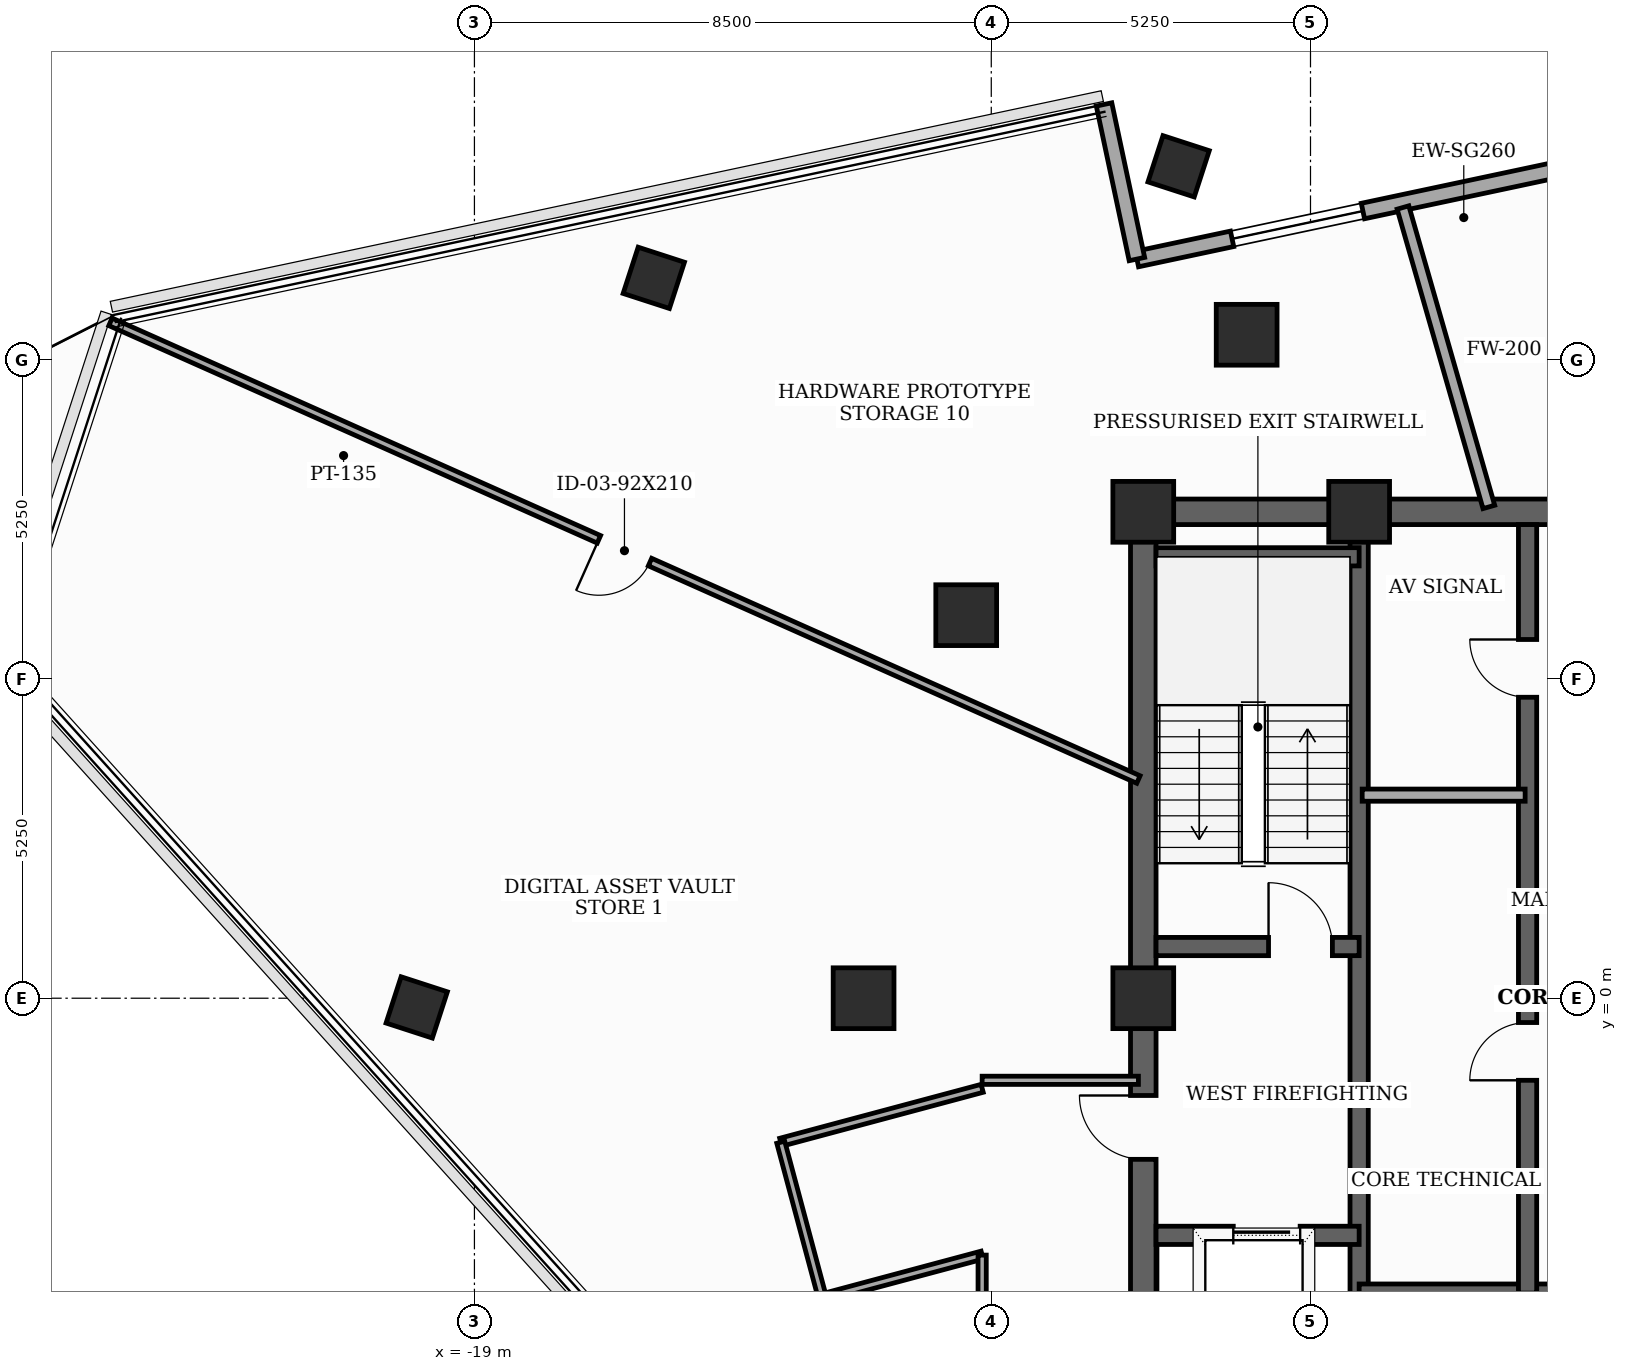
"""IFC4 building model, lengths in metres.
Left out: names, types, materials, properties, quantities, classifications, styles, units other than length and angle.
Written with IfcOpenShell. Run it as: python <this file> out.ifc"""

import sys

from ifc_helpers import new_model, si_unit, direction, frame, frame_2d, origin, origin_2d, place, context, subcontext, project, spatial, rectangle, extrude, element, fill, save


model = new_model("IFC4")
c1 = context("Model", 3, precision=1e-05, world=origin(), true_north=direction((0.0, 1.0)))
c2 = subcontext(c1, "Body", "Model", "MODEL_VIEW")
j1 = project(units=[si_unit("LENGTHUNIT", "METRE"), si_unit("PLANEANGLEUNIT", "RADIAN")], contexts=[c1])
p1 = place(None, origin())
s1 = spatial("IfcSite", under=j1, at=p1, CompositionType="ELEMENT")
p2 = place(p1, origin())
s2 = spatial("IfcBuilding", under=s1, at=p2, CompositionType="ELEMENT")
p3 = place(p2, frame((0.0, 0.0, 301.7)))
s3 = spatial("IfcBuildingStorey", under=s2, at=p3, CompositionType="ELEMENT", Elevation=301.7)
for number, where, z_axis, x_axis in (
    (1, (-4.45, 8.0, 0.0), (0.0, 0.0, 1.0), (1.0, 0.0, 0.0)),
    (2, (-8.0, 8.0, 0.0), (0.0, 0.0, 1.0), (1.0, 0.0, 0.0)),
    (3, (-8.0, 0.0, 0.0), (0.0, 0.0, 1.0), (1.0, 0.0, 0.0)),
    (4, (-6.3, 10.912, 0.0), (0.0, 0.0, 1.0), (1.0, 0.0, 0.0)),
    (5, (-10.912, 6.3, 0.0), (0.0, 0.0, 1.0), (1.0, 0.0, 0.0)),
    (6, (-12.6, 0.0, 0.0), (0.0, 0.0, 1.0), (1.0, 0.0, 0.0)),
):
    element("IfcColumn", number, at=place(p3, frame(where, z_axis=z_axis, x_axis=x_axis)), inside=s3, PredefinedType="COLUMN", context=c2, shape_type="SweptSolid", body=[
        extrude(rectangle(XDim=1.0, YDim=1.0, at=origin_2d()), origin(), (0.0, 0.0, 1.0), 3.7),
    ])
for number, where, z_axis, x_axis in (
    (7, (-7.419, 13.683, 0.0), (0.0, 0.0, 1.0), (0.309, 0.951, 0.0)),
    (8, (-16.05, 11.848, 0.0), (0.0, 0.0, 1.0), (0.309, 0.951, 0.0)),
    (9, (-19.949, -0.151, 0.0), (0.0, 0.0, 1.0), (0.309, 0.951, 0.0)),
):
    element("IfcColumn", number, at=place(p3, frame(where, z_axis=z_axis, x_axis=x_axis)), inside=s3, PredefinedType="COLUMN", context=c2, shape_type="SweptSolid", body=[
        extrude(rectangle(XDim=0.8, YDim=0.8, at=origin_2d()), origin(), (0.0, 0.0, 1.0), 3.7),
    ])
p4 = place(p3, frame((2.459, 14.402, 0.0), z_axis=(0.0, 0.0, 1.0), x_axis=(-0.978149082982, -0.207904717268, 0.0)))
e10 = element("IfcWall", 10, at=p4, inside=s3, PredefinedType="SOLIDWALL", context=c2, shape_type="SweptSolid", body=[
    extrude(rectangle(XDim=10.8, YDim=0.26, at=frame_2d((5.4, 0.0))), origin(), (0.0, 0.0, 1.0), 3.5),
])
p5 = place(p4, frame((1.6, 0.0, 0.85)))
e11 = element("IfcOpeningElement", 11, at=p5, cuts=e10, PredefinedType="OPENING", context=c2, shape_type="SweptSolid", body=[
    extrude(rectangle(XDim=2.2, YDim=1.25, at=frame_2d((1.1, 0.625))), frame((0.0, 0.14, 0.0), z_axis=(0.0, -1.0, 0.0), x_axis=(1.0, 0.0, 0.0)), (0.0, 0.0, 1.0), 0.28),
])
p6 = place(p4, frame((7.0, 0.0, 0.85)))
e12 = element("IfcOpeningElement", 12, at=p6, cuts=e10, PredefinedType="OPENING", context=c2, shape_type="SweptSolid", body=[
    extrude(rectangle(XDim=2.2, YDim=1.25, at=frame_2d((1.1, 0.625))), frame((0.0, 0.14, 0.0), z_axis=(0.0, -1.0, 0.0), x_axis=(1.0, 0.0, 0.0)), (0.0, 0.0, 1.0), 0.28),
])
p7 = place(p3, frame((-8.105, 12.157, 0.0), z_axis=(0.0, 0.0, 1.0), x_axis=(-0.207893569688, 0.978151452323, 0.0)))
e13 = element("IfcWall", 13, at=p7, inside=s3, PredefinedType="SOLIDWALL", context=c2, shape_type="SweptSolid", body=[
    extrude(rectangle(XDim=2.6, YDim=0.26, at=frame_2d((1.3, 0.0))), origin(), (0.0, 0.0, 1.0), 3.5),
])
p8 = place(p3, frame((-8.0, -8.0, 0.0), z_axis=(0.0, 0.0, 1.0), x_axis=(0.0, 1.0, 0.0)))
e14 = element("IfcWall", 14, at=p8, inside=s3, PredefinedType="SHEAR", context=c2, shape_type="SweptSolid", body=[
    extrude(rectangle(XDim=16.0, YDim=0.42, at=frame_2d((8.0, 0.0))), origin(), (0.0, 0.0, 1.0), 3.5),
])
p9 = place(p8, frame((0.681, 0.0, 0.0)))
e15 = element("IfcOpeningElement", 15, at=p9, cuts=e14, PredefinedType="OPENING", context=c2, shape_type="SweptSolid", body=[
    extrude(rectangle(XDim=0.85, YDim=2.02, at=frame_2d((0.425, 1.01))), frame((0.0, 0.22, 0.0), z_axis=(0.0, -1.0, 0.0), x_axis=(1.0, 0.0, 0.0)), (0.0, 0.0, 1.0), 0.44),
])
p10 = place(p8, frame((5.35, 0.0, 0.0)))
e16 = element("IfcOpeningElement", 16, at=p10, cuts=e14, PredefinedType="OPENING", context=c2, shape_type="SweptSolid", body=[
    extrude(rectangle(XDim=1.05, YDim=2.15, at=frame_2d((0.525, 1.075))), frame((0.0, 0.22, 0.0), z_axis=(0.0, -1.0, 0.0), x_axis=(1.0, 0.0, 0.0)), (0.0, 0.0, 1.0), 0.44),
])
p11 = place(p3, frame((-8.0, 8.0, 0.0), z_axis=(0.0, 0.0, 1.0), x_axis=(1.0, 0.0, 0.0)))
e17 = element("IfcWall", 17, at=p11, inside=s3, PredefinedType="SHEAR", context=c2, shape_type="SweptSolid", body=[
    extrude(rectangle(XDim=16.0, YDim=0.42, at=frame_2d((8.0, 0.0))), origin(), (0.0, 0.0, 1.0), 3.5),
])
p12 = place(p11, frame((7.1, 0.0, 0.0)))
e18 = element("IfcOpeningElement", 18, at=p12, cuts=e17, PredefinedType="OPENING", context=c2, shape_type="SweptSolid", body=[
    extrude(rectangle(XDim=1.8, YDim=2.15, at=frame_2d((0.9, 1.075))), frame((0.0, 0.22, 0.0), z_axis=(0.0, -1.0, 0.0), x_axis=(1.0, 0.0, 0.0)), (0.0, 0.0, 1.0), 0.44),
])
p13 = place(p3, frame((-4.45, -7.79, 0.0), z_axis=(0.0, 0.0, 1.0), x_axis=(0.0, 1.0, 0.0)))
e19 = element("IfcWall", 19, at=p13, inside=s3, PredefinedType="SHEAR", context=c2, shape_type="SweptSolid", body=[
    extrude(rectangle(XDim=15.58, YDim=0.3, at=frame_2d((7.79, 0.0))), origin(), (0.0, 0.0, 1.0), 3.5),
])
p14 = place(p3, frame((-7.79, 0.85, 0.0), z_axis=(0.0, 0.0, 1.0), x_axis=(1.0, 0.0, 0.0)))
e20 = element("IfcWall", 20, at=p14, inside=s3, PredefinedType="SHEAR", context=c2, shape_type="SweptSolid", body=[
    extrude(rectangle(XDim=3.34, YDim=0.3, at=frame_2d((1.67, 0.0))), origin(), (0.0, 0.0, 1.0), 3.5),
])
p15 = place(p14, frame((1.85, 0.0, 0.0)))
e21 = element("IfcOpeningElement", 21, at=p15, cuts=e20, PredefinedType="OPENING", context=c2, shape_type="SweptSolid", body=[
    extrude(rectangle(XDim=1.05, YDim=2.15, at=frame_2d((0.525, 1.075))), frame((0.0, 0.16, 0.0), z_axis=(0.0, -1.0, 0.0), x_axis=(1.0, 0.0, 0.0)), (0.0, 0.0, 1.0), 0.32),
])
p16 = place(p3, frame((-7.79, 7.26, 0.0), z_axis=(0.0, 0.0, 1.0), x_axis=(1.0, 0.0, 0.0)))
e22 = element("IfcWall", 22, at=p16, inside=s3, PredefinedType="SHEAR", context=c2, shape_type="SweptSolid", body=[
    extrude(rectangle(XDim=3.34, YDim=0.3, at=frame_2d((1.67, 0.0))), origin(), (0.0, 0.0, 1.0), 3.5),
])
p17 = place(p3, frame((-7.79, -3.9, 0.0), z_axis=(0.0, 0.0, 1.0), x_axis=(1.0, 0.0, 0.0)))
e23 = element("IfcWall", 23, at=p17, inside=s3, PredefinedType="SHEAR", context=c2, shape_type="SweptSolid", body=[
    extrude(rectangle(XDim=3.34, YDim=0.3, at=frame_2d((1.67, 0.0))), origin(), (0.0, 0.0, 1.0), 3.5),
])
p18 = place(p17, frame((1.27, 0.0, 0.0)))
e24 = element("IfcOpeningElement", 24, at=p18, cuts=e23, PredefinedType="OPENING", context=c2, shape_type="SweptSolid", body=[
    extrude(rectangle(XDim=1.1, YDim=2.1, at=frame_2d((0.55, 1.05))), frame((0.0, 0.16, 0.0), z_axis=(0.0, -1.0, 0.0), x_axis=(1.0, 0.0, 0.0)), (0.0, 0.0, 1.0), 0.32),
])
p19 = place(p3, frame((-4.45, -4.85, 0.0), z_axis=(0.0, 0.0, 1.0), x_axis=(1.0, 0.0, 0.0)))
e25 = element("IfcWall", 25, at=p19, inside=s3, PredefinedType="SHEAR", context=c2, shape_type="SweptSolid", body=[
    extrude(rectangle(XDim=8.9, YDim=0.3, at=frame_2d((4.45, 0.0))), origin(), (0.0, 0.0, 1.0), 3.5),
])
p20 = place(p3, frame((-1.68, -4.85, 0.0), z_axis=(0.0, 0.0, 1.0), x_axis=(0.0, 1.0, 0.0)))
e26 = element("IfcWall", 26, at=p20, inside=s3, PredefinedType="SHEAR", context=c2, shape_type="SweptSolid", body=[
    extrude(rectangle(XDim=12.64, YDim=0.3, at=frame_2d((6.32, 0.0))), origin(), (0.0, 0.0, 1.0), 3.5),
])
p21 = place(p20, frame((3.5, 0.0, 0.0)))
e27 = element("IfcOpeningElement", 27, at=p21, cuts=e26, PredefinedType="OPENING", context=c2, shape_type="SweptSolid", body=[
    extrude(rectangle(XDim=0.95, YDim=2.1, at=frame_2d((0.475, 1.05))), frame((0.0, 0.16, 0.0), z_axis=(0.0, -1.0, 0.0), x_axis=(1.0, 0.0, 0.0)), (0.0, 0.0, 1.0), 0.32),
])
p22 = place(p20, frame((9.8, 0.0, 0.0)))
e28 = element("IfcOpeningElement", 28, at=p22, cuts=e26, PredefinedType="OPENING", context=c2, shape_type="SweptSolid", body=[
    extrude(rectangle(XDim=0.95, YDim=2.1, at=frame_2d((0.475, 1.05))), frame((0.0, 0.16, 0.0), z_axis=(0.0, -1.0, 0.0), x_axis=(1.0, 0.0, 0.0)), (0.0, 0.0, 1.0), 0.32),
])
p23 = place(p3, frame((-4.4, 3.34, 0.0), z_axis=(0.0, 0.0, 1.0), x_axis=(1.0, 0.0, 0.0)))
e29 = element("IfcWall", 29, at=p23, inside=s3, PredefinedType="SOLIDWALL", context=c2, shape_type="SweptSolid", body=[
    extrude(rectangle(XDim=2.68, YDim=0.2, at=frame_2d((1.34, 0.0))), origin(), (0.0, 0.0, 1.0), 3.5),
])
p24 = place(p3, frame((-8.08, -1.35, 0.0), z_axis=(0.0, 0.0, 1.0), x_axis=(-1.0, 0.0, 0.0)))
e30 = element("IfcWall", 30, at=p24, inside=s3, PredefinedType="PARTITIONING", context=c2, shape_type="SweptSolid", body=[
    extrude(rectangle(XDim=2.57, YDim=0.135, at=frame_2d((1.285, 0.0))), origin(), (0.0, 0.0, 1.0), 2.885),
])
p25 = place(p3, frame((-10.65, -1.482, 0.0), z_axis=(0.0, 0.0, 1.0), x_axis=(-0.965961397105, -0.2586862565, 0.0)))
e31 = element("IfcWall", 31, at=p25, inside=s3, PredefinedType="PARTITIONING", context=c2, shape_type="SweptSolid", body=[
    extrude(rectangle(XDim=3.429, YDim=0.135, at=frame_2d((1.714, 0.0))), origin(), (0.0, 0.0, 1.0), 2.885),
])
p26 = place(p3, frame((-13.962, -2.369, 0.0), z_axis=(0.0, 0.0, 1.0), x_axis=(0.258413725385, -0.966034340245, 0.0)))
e32 = element("IfcWall", 32, at=p26, inside=s3, PredefinedType="PARTITIONING", context=c2, shape_type="SweptSolid", body=[
    extrude(rectangle(XDim=2.65, YDim=0.135, at=frame_2d((1.325, 0.0))), origin(), (0.0, 0.0, 1.0), 3.5),
])
p27 = place(p3, frame((-13.277, -4.929, 0.0), z_axis=(0.0, 0.0, 1.0), x_axis=(0.965934830229, 0.258785439601, 0.0)))
e33 = element("IfcWall", 33, at=p27, inside=s3, PredefinedType="PARTITIONING", context=c2, shape_type="SweptSolid", body=[
    extrude(rectangle(XDim=2.72, YDim=0.135, at=frame_2d((1.36, 0.0))), origin(), (0.0, 0.0, 1.0), 2.885),
])
p28 = place(p3, frame((-10.65, -4.225, 0.0), z_axis=(0.0, 0.0, 1.0), x_axis=(0.0, -1.0, 0.0)))
e34 = element("IfcWall", 34, at=p28, inside=s3, PredefinedType="PARTITIONING", context=c2, shape_type="SweptSolid", body=[
    extrude(rectangle(XDim=5.925, YDim=0.135, at=frame_2d((2.962, 0.0))), origin(), (0.0, 0.0, 1.0), 2.885),
])
p29 = place(p28, frame((4.265, 0.0, 0.0)))
e35 = element("IfcOpeningElement", 35, at=p29, cuts=e34, PredefinedType="OPENING", context=c2, shape_type="SweptSolid", body=[
    extrude(rectangle(XDim=0.95, YDim=2.1, at=frame_2d((0.475, 1.05))), frame((0.0, 0.077, 0.0), z_axis=(0.0, -1.0, 0.0), x_axis=(1.0, 0.0, 0.0)), (0.0, 0.0, 1.0), 0.155),
])
p30 = place(p3, frame((-8.08, 3.597, 0.0), z_axis=(0.0, 0.0, 1.0), x_axis=(-0.913542590258, 0.406743083266, 0.0)))
e36 = element("IfcWall", 36, at=p30, inside=s3, PredefinedType="PARTITIONING", context=c2, shape_type="SweptSolid", body=[
    extrude(rectangle(XDim=18.505, YDim=0.135, at=frame_2d((9.252, 0.0))), origin(), (0.0, 0.0, 1.0), 2.885),
])
p31 = place(p30, frame((8.792, 0.0, 0.0)))
e37 = element("IfcOpeningElement", 37, at=p31, cuts=e36, PredefinedType="OPENING", context=c2, shape_type="SweptSolid", body=[
    extrude(rectangle(XDim=0.92, YDim=2.1, at=frame_2d((0.46, 1.05))), frame((0.0, 0.077, 0.0), z_axis=(0.0, -1.0, 0.0), x_axis=(1.0, 0.0, 0.0)), (0.0, 0.0, 1.0), 0.155),
])
p32 = place(p3, frame((-3.729, 13.005, 0.0), z_axis=(0.0, 0.0, 1.0), x_axis=(0.275658725111, -0.961255568135, 0.0)))
e38 = element("IfcWall", 38, at=p32, inside=s3, PredefinedType="SOLIDWALL", context=c2, shape_type="SweptSolid", body=[
    extrude(rectangle(XDim=5.124, YDim=0.2, at=frame_2d((2.562, 0.0))), origin(), (0.0, 0.0, 1.0), 2.885),
])
p33 = place(p6, origin())
e39 = element("IfcWindow", 39, at=p33, inside=s3, PartitioningType="SINGLE_PANEL", PredefinedType="WINDOW", context=c2, shape_type="SweptSolid", body=[
    extrude(rectangle(XDim=2.2, YDim=1.25, at=frame_2d((1.1, 0.625))), frame((0.0, 0.03, 0.0), z_axis=(0.0, -1.0, 0.0), x_axis=(1.0, 0.0, 0.0)), (0.0, 0.0, 1.0), 0.06),
])
fill(e12, e39)
p34 = place(p10, origin())
e40 = element("IfcDoor", 40, at=p34, inside=s3, OperationType="SINGLE_SWING_RIGHT", PredefinedType="DOOR", context=c2, shape_type="SweptSolid", body=[
    extrude(rectangle(XDim=1.05, YDim=2.15, at=frame_2d((0.525, 1.075))), frame((0.0, 0.025, 0.0), z_axis=(0.0, -1.0, 0.0), x_axis=(1.0, 0.0, 0.0)), (0.0, 0.0, 1.0), 0.05),
])
fill(e16, e40)
p35 = place(p15, origin())
e41 = element("IfcDoor", 41, at=p35, inside=s3, OperationType="SINGLE_SWING_LEFT", PredefinedType="DOOR", context=c2, shape_type="SweptSolid", body=[
    extrude(rectangle(XDim=1.05, YDim=2.15, at=frame_2d((0.525, 1.075))), frame((0.0, 0.025, 0.0), z_axis=(0.0, -1.0, 0.0), x_axis=(1.0, 0.0, 0.0)), (0.0, 0.0, 1.0), 0.05),
])
fill(e21, e41)
p36 = place(p18, origin())
e42 = element("IfcDoor", 42, at=p36, inside=s3, OperationType="SLIDING_TO_LEFT", PredefinedType="DOOR", context=c2, shape_type="SweptSolid", body=[
    extrude(rectangle(XDim=1.1, YDim=2.1, at=frame_2d((0.55, 1.05))), frame((0.0, 0.025, 0.0), z_axis=(0.0, -1.0, 0.0), x_axis=(1.0, 0.0, 0.0)), (0.0, 0.0, 1.0), 0.05),
])
fill(e24, e42)
p37 = place(p21, origin())
e43 = element("IfcDoor", 43, at=p37, inside=s3, OperationType="SINGLE_SWING_LEFT", PredefinedType="DOOR", context=c2, shape_type="SweptSolid", body=[
    extrude(rectangle(XDim=0.95, YDim=2.1, at=frame_2d((0.475, 1.05))), frame((0.0, 0.025, 0.0), z_axis=(0.0, -1.0, 0.0), x_axis=(1.0, 0.0, 0.0)), (0.0, 0.0, 1.0), 0.05),
])
fill(e27, e43)
p38 = place(p22, origin())
e44 = element("IfcDoor", 44, at=p38, inside=s3, OperationType="SINGLE_SWING_RIGHT", PredefinedType="DOOR", context=c2, shape_type="SweptSolid", body=[
    extrude(rectangle(XDim=0.95, YDim=2.1, at=frame_2d((0.475, 1.05))), frame((0.0, 0.025, 0.0), z_axis=(0.0, -1.0, 0.0), x_axis=(1.0, 0.0, 0.0)), (0.0, 0.0, 1.0), 0.05),
])
fill(e28, e44)
p39 = place(p31, origin())
e45 = element("IfcDoor", 45, at=p39, inside=s3, OperationType="SINGLE_SWING_RIGHT", PredefinedType="DOOR", context=c2, shape_type="SweptSolid", body=[
    extrude(rectangle(XDim=0.92, YDim=2.1, at=frame_2d((0.46, 1.05))), frame((0.0, 0.025, 0.0), z_axis=(0.0, -1.0, 0.0), x_axis=(1.0, 0.0, 0.0)), (0.0, 0.0, 1.0), 0.05),
])
fill(e37, e45)
save(model, sys.argv[1])
